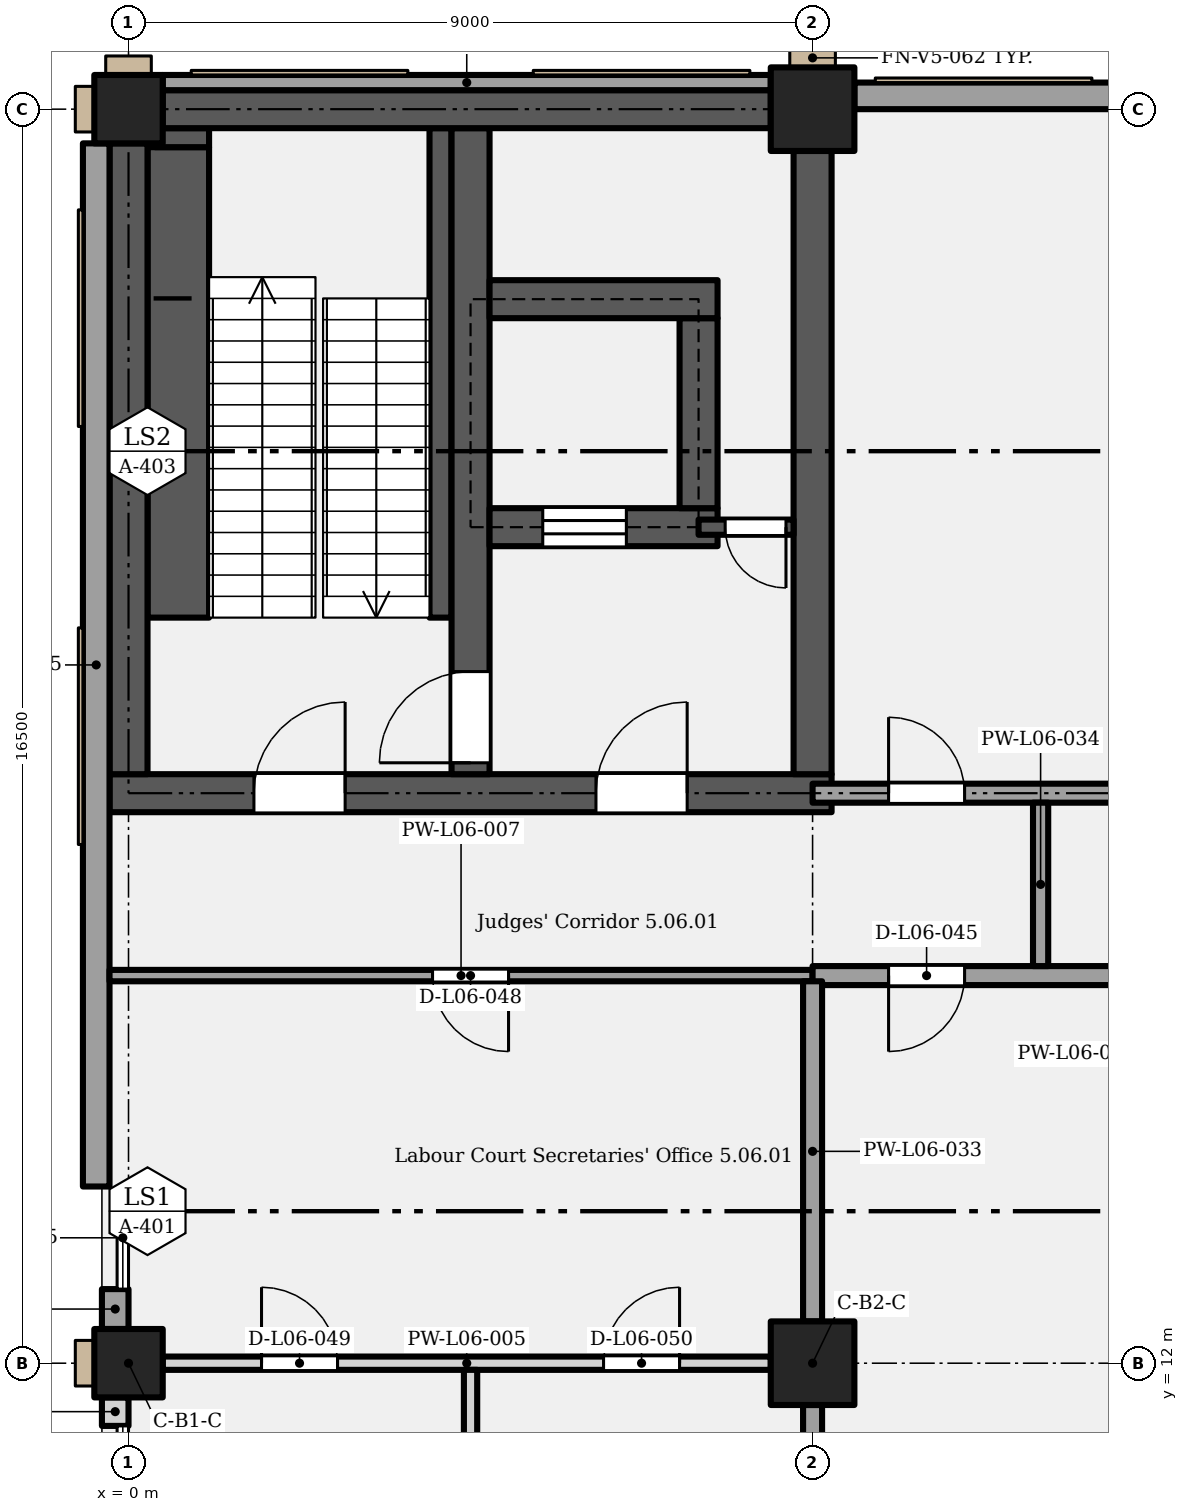
"""IFC4 building model, lengths in metres.
Left out: names, types, materials, properties, quantities, classifications, styles, units other than length and angle.
Written with IfcOpenShell. Run it as: python <this file> out.ifc"""

import sys

from ifc_helpers import new_model, si_unit, direction, frame, frame_2d, origin, origin_2d, place, context, subcontext, project, spatial, rectangle, extrude, element, fill, save


model = new_model("IFC4")
c1 = context("Model", 3, precision=1e-05, world=origin(), true_north=direction((0.0, 1.0)))
c2 = subcontext(c1, "Body", "Model", "MODEL_VIEW")
j1 = project(units=[si_unit("LENGTHUNIT", "METRE"), si_unit("PLANEANGLEUNIT", "RADIAN")], contexts=[c1])
p1 = place(None, origin())
s1 = spatial("IfcSite", under=j1, at=p1, CompositionType="ELEMENT")
p2 = place(p1, origin())
s2 = spatial("IfcBuilding", under=s1, at=p2, CompositionType="ELEMENT")
p3 = place(p2, frame((0.0, 0.0, 33.6)))
s3 = spatial("IfcBuildingStorey", under=s2, at=p3, CompositionType="ELEMENT", Elevation=33.6)
p4 = place(p3, frame((0.0, 12.0, 0.0), z_axis=(0.0, 0.0, 1.0), x_axis=(1.0, 0.0, 0.0)))
e1 = element("IfcColumn", 1, at=p4, inside=s3, PredefinedType="COLUMN", context=c2, shape_type="SweptSolid", body=[
    extrude(rectangle(XDim=0.9, YDim=0.9, at=origin_2d()), origin(), (0.0, 0.0, 1.0), 5.4),
])
p5 = place(p3, frame((9.0, 12.0, 0.0), z_axis=(0.0, 0.0, 1.0), x_axis=(1.0, 0.0, 0.0)))
e2 = element("IfcColumn", 2, at=p5, inside=s3, PredefinedType="COLUMN", context=c2, shape_type="SweptSolid", body=[
    extrude(rectangle(XDim=1.1, YDim=1.1, at=origin_2d()), origin(), (0.0, 0.0, 1.0), 5.4),
])
p6 = place(p3, frame((0.0, 28.5, 0.0), z_axis=(0.0, 0.0, 1.0), x_axis=(1.0, 0.0, 0.0)))
e3 = element("IfcColumn", 3, at=p6, inside=s3, PredefinedType="COLUMN", context=c2, shape_type="SweptSolid", body=[
    extrude(rectangle(XDim=0.9, YDim=0.9, at=origin_2d()), origin(), (0.0, 0.0, 1.0), 5.4),
])
p7 = place(p3, frame((9.0, 28.5, 0.0), z_axis=(0.0, 0.0, 1.0), x_axis=(1.0, 0.0, 0.0)))
e4 = element("IfcColumn", 4, at=p7, inside=s3, PredefinedType="COLUMN", context=c2, shape_type="SweptSolid", body=[
    extrude(rectangle(XDim=1.1, YDim=1.1, at=origin_2d()), origin(), (0.0, 0.0, 1.0), 5.4),
])
p8 = place(p3, frame((-0.25, 19.5, 0.0), z_axis=(0.0, 0.0, 1.0), x_axis=(1.0, 0.0, 0.0)))
e5 = element("IfcWall", 5, at=p8, inside=s3, PredefinedType="SHEAR", context=c2, shape_type="SweptSolid", body=[
    extrude(rectangle(XDim=9.5, YDim=0.5, at=frame_2d((4.75, 0.0))), origin(), (0.0, 0.0, 1.0), 5.15),
])
p9 = place(p8, frame((1.9, 0.0, 0.0)))
e6 = element("IfcOpeningElement", 6, at=p9, cuts=e5, PredefinedType="OPENING", context=c2, shape_type="SweptSolid", body=[
    extrude(rectangle(XDim=1.2, YDim=2.1, at=frame_2d((0.6, 1.05))), frame((0.0, 0.26, 0.0), z_axis=(0.0, -1.0, 0.0), x_axis=(1.0, 0.0, 0.0)), (0.0, 0.0, 1.0), 0.52),
])
p10 = place(p8, frame((6.4, 0.0, 0.0)))
e7 = element("IfcOpeningElement", 7, at=p10, cuts=e5, PredefinedType="OPENING", context=c2, shape_type="SweptSolid", body=[
    extrude(rectangle(XDim=1.2, YDim=2.1, at=frame_2d((0.6, 1.05))), frame((0.0, 0.26, 0.0), z_axis=(0.0, -1.0, 0.0), x_axis=(1.0, 0.0, 0.0)), (0.0, 0.0, 1.0), 0.52),
])
p11 = place(p3, frame((0.0, 19.75, 0.0), z_axis=(0.0, 0.0, 1.0), x_axis=(0.0, 1.0, 0.0)))
e8 = element("IfcWall", 8, at=p11, inside=s3, PredefinedType="SHEAR", context=c2, shape_type="SweptSolid", body=[
    extrude(rectangle(XDim=8.3, YDim=0.5, at=frame_2d((4.15, 0.0))), origin(), (0.0, 0.0, 1.0), 5.15),
])
p12 = place(p3, frame((4.5, 19.75, 0.0), z_axis=(0.0, 0.0, 1.0), x_axis=(0.0, 1.0, 0.0)))
e9 = element("IfcWall", 9, at=p12, inside=s3, PredefinedType="SHEAR", context=c2, shape_type="SweptSolid", body=[
    extrude(rectangle(XDim=8.5, YDim=0.5, at=frame_2d((4.25, 0.0))), origin(), (0.0, 0.0, 1.0), 5.15),
])
p13 = place(p12, frame((0.15, 0.0, 0.0)))
e10 = element("IfcOpeningElement", 10, at=p13, cuts=e9, PredefinedType="OPENING", context=c2, shape_type="SweptSolid", body=[
    extrude(rectangle(XDim=1.2, YDim=2.1, at=frame_2d((0.6, 1.05))), frame((0.0, 0.26, 0.0), z_axis=(0.0, -1.0, 0.0), x_axis=(1.0, 0.0, 0.0)), (0.0, 0.0, 1.0), 0.52),
])
p14 = place(p3, frame((9.0, 19.75, 0.0), z_axis=(0.0, 0.0, 1.0), x_axis=(0.0, 1.0, 0.0)))
e11 = element("IfcWall", 11, at=p14, inside=s3, PredefinedType="SHEAR", context=c2, shape_type="SweptSolid", body=[
    extrude(rectangle(XDim=8.2, YDim=0.5, at=frame_2d((4.1, 0.0))), origin(), (0.0, 0.0, 1.0), 5.15),
])
p15 = place(p3, frame((4.75, 23.0, 0.0), z_axis=(0.0, 0.0, 1.0), x_axis=(1.0, 0.0, 0.0)))
e12 = element("IfcWall", 12, at=p15, inside=s3, PredefinedType="SHEAR", context=c2, shape_type="SweptSolid", body=[
    extrude(rectangle(XDim=3.0, YDim=0.5, at=frame_2d((1.5, 0.0))), origin(), (0.0, 0.0, 1.0), 5.15),
])
p16 = place(p15, frame((0.7, 0.0, 0.0)))
e13 = element("IfcOpeningElement", 13, at=p16, cuts=e12, PredefinedType="OPENING", context=c2, shape_type="SweptSolid", body=[
    extrude(rectangle(XDim=1.1, YDim=2.1, at=frame_2d((0.55, 1.05))), frame((0.0, 0.26, 0.0), z_axis=(0.0, -1.0, 0.0), x_axis=(1.0, 0.0, 0.0)), (0.0, 0.0, 1.0), 0.52),
])
p17 = place(p3, frame((7.5, 23.25, 0.0), z_axis=(0.0, 0.0, 1.0), x_axis=(0.0, 1.0, 0.0)))
e14 = element("IfcWall", 14, at=p17, inside=s3, PredefinedType="SHEAR", context=c2, shape_type="SweptSolid", body=[
    extrude(rectangle(XDim=2.5, YDim=0.5, at=frame_2d((1.25, 0.0))), origin(), (0.0, 0.0, 1.0), 5.15),
])
p18 = place(p3, frame((4.75, 26.0, 0.0), z_axis=(0.0, 0.0, 1.0), x_axis=(1.0, 0.0, 0.0)))
e15 = element("IfcWall", 15, at=p18, inside=s3, PredefinedType="SHEAR", context=c2, shape_type="SweptSolid", body=[
    extrude(rectangle(XDim=3.0, YDim=0.5, at=frame_2d((1.5, 0.0))), origin(), (0.0, 0.0, 1.0), 5.15),
])
p19 = place(p3, frame((0.45, 28.5, 0.0), z_axis=(0.0, 0.0, 1.0), x_axis=(1.0, 0.0, 0.0)))
e16 = element("IfcWall", 16, at=p19, inside=s3, PredefinedType="SHEAR", context=c2, shape_type="SweptSolid", body=[
    extrude(rectangle(XDim=8.0, YDim=0.5, at=frame_2d((4.0, 0.0))), origin(), (0.0, 0.0, 1.0), 5.15),
])
p20 = place(p3, frame((0.45, 28.85, 0.0), z_axis=(0.0, 0.0, 1.0), x_axis=(1.0, 0.0, 0.0)))
e17 = element("IfcWall", 17, at=p20, inside=s3, PredefinedType="SOLIDWALL", context=c2, shape_type="SweptSolid", body=[
    extrude(rectangle(XDim=8.0, YDim=0.2, at=frame_2d((4.0, 0.0))), origin(), (0.0, 0.0, 1.0), 5.15),
])
p21 = place(p3, frame((9.55, 28.675, 0.0), z_axis=(0.0, 0.0, 1.0), x_axis=(1.0, 0.0, 0.0)))
e18 = element("IfcWall", 18, at=p21, inside=s3, PredefinedType="SOLIDWALL", context=c2, shape_type="SweptSolid", body=[
    extrude(rectangle(XDim=7.9, YDim=0.35, at=frame_2d((3.95, 0.0))), origin(), (0.0, 0.0, 1.0), 5.15),
])
p22 = place(p3, frame((-0.175, 11.175, 0.0), z_axis=(0.0, 0.0, 1.0), x_axis=(0.0, 1.0, 0.0)))
e19 = element("IfcWall", 19, at=p22, inside=s3, PredefinedType="SOLIDWALL", context=c2, shape_type="SweptSolid", body=[
    extrude(rectangle(XDim=0.375, YDim=0.35, at=frame_2d((0.188, 0.0))), origin(), (0.0, 0.0, 1.0), 5.15),
])
p23 = place(p3, frame((-0.175, 12.45, 0.0), z_axis=(0.0, 0.0, 1.0), x_axis=(0.0, 1.0, 0.0)))
e20 = element("IfcWall", 20, at=p23, inside=s3, PredefinedType="SOLIDWALL", context=c2, shape_type="SweptSolid", body=[
    extrude(rectangle(XDim=0.525, YDim=0.35, at=frame_2d((0.263, 0.0))), origin(), (0.0, 0.0, 1.0), 5.15),
])
p24 = place(p3, frame((-0.425, 14.325, 0.0), z_axis=(0.0, 0.0, 1.0), x_axis=(0.0, 1.0, 0.0)))
e21 = element("IfcWall", 21, at=p24, inside=s3, PredefinedType="SOLIDWALL", context=c2, shape_type="SweptSolid", body=[
    extrude(rectangle(XDim=13.725, YDim=0.35, at=frame_2d((6.863, 0.0))), origin(), (0.0, 0.0, 1.0), 5.15),
])
p25 = place(p3, frame((0.45, 12.0, 0.0), z_axis=(0.0, 0.0, 1.0), x_axis=(1.0, 0.0, 0.0)))
e22 = element("IfcWall", 22, at=p25, inside=s3, PredefinedType="PARTITIONING", context=c2, shape_type="SweptSolid", body=[
    extrude(rectangle(XDim=8.0, YDim=0.175, at=frame_2d((4.0, 0.0))), origin(), (0.0, 0.0, 1.0), 4.4),
])
p26 = place(p25, frame((1.3, 0.0, 0.0)))
e23 = element("IfcOpeningElement", 23, at=p26, cuts=e22, PredefinedType="OPENING", context=c2, shape_type="SweptSolid", body=[
    extrude(rectangle(XDim=1.0, YDim=2.1, at=frame_2d((0.5, 1.05))), frame((0.0, 0.097, 0.0), z_axis=(0.0, -1.0, 0.0), x_axis=(1.0, 0.0, 0.0)), (0.0, 0.0, 1.0), 0.195),
])
p27 = place(p25, frame((5.8, 0.0, 0.0)))
e24 = element("IfcOpeningElement", 24, at=p27, cuts=e22, PredefinedType="OPENING", context=c2, shape_type="SweptSolid", body=[
    extrude(rectangle(XDim=1.0, YDim=2.1, at=frame_2d((0.5, 1.05))), frame((0.0, 0.097, 0.0), z_axis=(0.0, -1.0, 0.0), x_axis=(1.0, 0.0, 0.0)), (0.0, 0.0, 1.0), 0.195),
])
p28 = place(p3, frame((-0.25, 17.1, 0.0), z_axis=(0.0, 0.0, 1.0), x_axis=(1.0, 0.0, 0.0)))
e25 = element("IfcWall", 25, at=p28, inside=s3, PredefinedType="PARTITIONING", context=c2, shape_type="SweptSolid", body=[
    extrude(rectangle(XDim=9.25, YDim=0.15, at=frame_2d((4.625, 0.0))), origin(), (0.0, 0.0, 1.0), 5.15),
])
p29 = place(p28, frame((5.25, 0.0, 0.0), z_axis=(0.0, 0.0, 1.0), x_axis=(-1.0, 0.0, 0.0)))
e26 = element("IfcOpeningElement", 26, at=p29, cuts=e25, PredefinedType="OPENING", context=c2, shape_type="SweptSolid", body=[
    extrude(rectangle(XDim=1.0, YDim=2.1, at=frame_2d((0.5, 1.05))), frame((0.0, 0.085, 0.0), z_axis=(0.0, -1.0, 0.0), x_axis=(1.0, 0.0, 0.0)), (0.0, 0.0, 1.0), 0.17),
])
p30 = place(p3, frame((9.0, 17.1, 0.0), z_axis=(0.0, 0.0, 1.0), x_axis=(1.0, 0.0, 0.0)))
e27 = element("IfcWall", 27, at=p30, inside=s3, PredefinedType="PARTITIONING", context=c2, shape_type="SweptSolid", body=[
    extrude(rectangle(XDim=9.0, YDim=0.25, at=frame_2d((4.5, 0.0))), origin(), (0.0, 0.0, 1.0), 5.15),
])
p31 = place(p30, frame((6.9, 0.0, 0.0), z_axis=(0.0, 0.0, 1.0), x_axis=(-1.0, 0.0, 0.0)))
e28 = element("IfcOpeningElement", 28, at=p31, cuts=e27, PredefinedType="OPENING", context=c2, shape_type="SweptSolid", body=[
    extrude(rectangle(XDim=1.8, YDim=2.4, at=frame_2d((0.9, 1.2))), frame((0.0, 0.135, 0.0), z_axis=(0.0, -1.0, 0.0), x_axis=(1.0, 0.0, 0.0)), (0.0, 0.0, 1.0), 0.27),
])
p32 = place(p30, frame((2.0, 0.0, 0.0), z_axis=(0.0, 0.0, 1.0), x_axis=(-1.0, 0.0, 0.0)))
e29 = element("IfcOpeningElement", 29, at=p32, cuts=e27, PredefinedType="OPENING", context=c2, shape_type="SweptSolid", body=[
    extrude(rectangle(XDim=1.0, YDim=2.1, at=frame_2d((0.5, 1.05))), frame((0.0, 0.135, 0.0), z_axis=(0.0, -1.0, 0.0), x_axis=(1.0, 0.0, 0.0)), (0.0, 0.0, 1.0), 0.27),
])
p33 = place(p3, frame((9.0, 19.5, 0.0), z_axis=(0.0, 0.0, 1.0), x_axis=(1.0, 0.0, 0.0)))
e30 = element("IfcWall", 30, at=p33, inside=s3, PredefinedType="PARTITIONING", context=c2, shape_type="SweptSolid", body=[
    extrude(rectangle(XDim=9.0, YDim=0.25, at=frame_2d((4.5, 0.0))), origin(), (0.0, 0.0, 1.0), 5.15),
])
p34 = place(p33, frame((5.1, 0.0, 0.0)))
e31 = element("IfcOpeningElement", 31, at=p34, cuts=e30, PredefinedType="OPENING", context=c2, shape_type="SweptSolid", body=[
    extrude(rectangle(XDim=1.8, YDim=2.4, at=frame_2d((0.9, 1.2))), frame((0.0, 0.135, 0.0), z_axis=(0.0, -1.0, 0.0), x_axis=(1.0, 0.0, 0.0)), (0.0, 0.0, 1.0), 0.27),
])
p35 = place(p33, frame((1.0, 0.0, 0.0)))
e32 = element("IfcOpeningElement", 32, at=p35, cuts=e30, PredefinedType="OPENING", context=c2, shape_type="SweptSolid", body=[
    extrude(rectangle(XDim=1.0, YDim=2.1, at=frame_2d((0.5, 1.05))), frame((0.0, 0.135, 0.0), z_axis=(0.0, -1.0, 0.0), x_axis=(1.0, 0.0, 0.0)), (0.0, 0.0, 1.0), 0.27),
])
p36 = place(p3, frame((7.5, 23.0, 0.0), z_axis=(0.0, 0.0, 1.0), x_axis=(1.0, 0.0, 0.0)))
e33 = element("IfcWall", 33, at=p36, inside=s3, PredefinedType="SHEAR", context=c2, shape_type="SweptSolid", body=[
    extrude(rectangle(XDim=1.25, YDim=0.2, at=frame_2d((0.625, 0.0))), origin(), (0.0, 0.0, 1.0), 5.15),
])
p37 = place(p36, frame((1.15, 0.0, 0.0), z_axis=(0.0, 0.0, 1.0), x_axis=(-1.0, 0.0, 0.0)))
e34 = element("IfcOpeningElement", 34, at=p37, cuts=e33, PredefinedType="OPENING", context=c2, shape_type="SweptSolid", body=[
    extrude(rectangle(XDim=0.8, YDim=2.0, at=frame_2d((0.4, 1.0))), frame((0.0, 0.11, 0.0), z_axis=(0.0, -1.0, 0.0), x_axis=(1.0, 0.0, 0.0)), (0.0, 0.0, 1.0), 0.22),
])
p38 = place(p3, frame((4.5, 0.0, 0.0), z_axis=(0.0, 0.0, 1.0), x_axis=(0.0, 1.0, 0.0)))
e35 = element("IfcWall", 35, at=p38, inside=s3, PredefinedType="PARTITIONING", context=c2, shape_type="SweptSolid", body=[
    extrude(rectangle(XDim=11.913, YDim=0.175, at=frame_2d((5.956, 0.0))), origin(), (0.0, 0.0, 1.0), 5.15),
])
p39 = place(p3, frame((9.0, 0.55, 0.0), z_axis=(0.0, 0.0, 1.0), x_axis=(0.0, 1.0, 0.0)))
e36 = element("IfcWall", 36, at=p39, inside=s3, PredefinedType="PARTITIONING", context=c2, shape_type="SweptSolid", body=[
    extrude(rectangle(XDim=10.9, YDim=0.25, at=frame_2d((5.45, 0.0))), origin(), (0.0, 0.0, 1.0), 4.4),
])
p40 = place(p39, frame((5.95, 0.0, 0.0), z_axis=(0.0, 0.0, 1.0), x_axis=(-1.0, 0.0, 0.0)))
e37 = element("IfcOpeningElement", 37, at=p40, cuts=e36, PredefinedType="OPENING", context=c2, shape_type="SweptSolid", body=[
    extrude(rectangle(XDim=1.0, YDim=2.1, at=frame_2d((0.5, 1.05))), frame((0.0, 0.135, 0.0), z_axis=(0.0, -1.0, 0.0), x_axis=(1.0, 0.0, 0.0)), (0.0, 0.0, 1.0), 0.27),
])
p41 = place(p3, frame((9.0, 12.55, 0.0), z_axis=(0.0, 0.0, 1.0), x_axis=(0.0, 1.0, 0.0)))
e38 = element("IfcWall", 38, at=p41, inside=s3, PredefinedType="PARTITIONING", context=c2, shape_type="SweptSolid", body=[
    extrude(rectangle(XDim=4.475, YDim=0.25, at=frame_2d((2.237, 0.0))), origin(), (0.0, 0.0, 1.0), 4.2),
])
p42 = place(p3, frame((12.0, 17.225, 0.0), z_axis=(0.0, 0.0, 1.0), x_axis=(0.0, 1.0, 0.0)))
e39 = element("IfcWall", 39, at=p42, inside=s3, PredefinedType="PARTITIONING", context=c2, shape_type="SweptSolid", body=[
    extrude(rectangle(XDim=2.15, YDim=0.2, at=frame_2d((1.075, 0.0))), origin(), (0.0, 0.0, 1.0), 5.15),
])
p43 = place(p3, frame((0.655, 21.81, 0.0), z_axis=(0.0, 0.0, 1.0), x_axis=(0.0, 1.0, 0.0)))
e40 = element("IfcWall", 40, at=p43, inside=s3, PredefinedType="SHEAR", context=c2, shape_type="SweptSolid", body=[
    extrude(rectangle(XDim=6.19, YDim=0.81, at=frame_2d((3.095, 0.0))), origin(), (0.0, 0.0, 1.0), 2.587),
])
p44 = place(p3, frame((0.705, 28.0, 0.0), z_axis=(0.0, 0.0, 1.0), x_axis=(0.0, 1.0, 0.0)))
e41 = element("IfcWall", 41, at=p44, inside=s3, PredefinedType="SHEAR", context=c2, shape_type="SweptSolid", body=[
    extrude(rectangle(XDim=0.25, YDim=0.71, at=frame_2d((0.125, 0.0))), origin(), (0.0, 0.0, 1.0), 2.587),
])
p45 = place(p3, frame((4.105, 21.81, 0.0), z_axis=(0.0, 0.0, 1.0), x_axis=(0.0, 1.0, 0.0)))
e42 = element("IfcWall", 42, at=p45, inside=s3, PredefinedType="SHEAR", context=c2, shape_type="SweptSolid", body=[
    extrude(rectangle(XDim=6.44, YDim=0.29, at=frame_2d((3.22, 0.0))), origin(), (0.0, 0.0, 1.0), 2.587),
])
p46 = place(p9, origin())
e43 = element("IfcDoor", 43, at=p46, inside=s3, OperationType="SINGLE_SWING_RIGHT", PredefinedType="DOOR", context=c2, shape_type="SweptSolid", body=[
    extrude(rectangle(XDim=1.2, YDim=2.1, at=frame_2d((0.6, 1.05))), frame((0.0, 0.025, 0.0), z_axis=(0.0, -1.0, 0.0), x_axis=(1.0, 0.0, 0.0)), (0.0, 0.0, 1.0), 0.05),
])
fill(e6, e43)
p47 = place(p13, origin())
e44 = element("IfcDoor", 44, at=p47, inside=s3, OperationType="SINGLE_SWING_LEFT", PredefinedType="DOOR", context=c2, shape_type="SweptSolid", body=[
    extrude(rectangle(XDim=1.2, YDim=2.1, at=frame_2d((0.6, 1.05))), frame((0.0, 0.025, 0.0), z_axis=(0.0, -1.0, 0.0), x_axis=(1.0, 0.0, 0.0)), (0.0, 0.0, 1.0), 0.05),
])
fill(e10, e44)
p48 = place(p10, origin())
e45 = element("IfcDoor", 45, at=p48, inside=s3, OperationType="SINGLE_SWING_RIGHT", PredefinedType="DOOR", context=c2, shape_type="SweptSolid", body=[
    extrude(rectangle(XDim=1.2, YDim=2.1, at=frame_2d((0.6, 1.05))), frame((0.0, 0.025, 0.0), z_axis=(0.0, -1.0, 0.0), x_axis=(1.0, 0.0, 0.0)), (0.0, 0.0, 1.0), 0.05),
])
fill(e7, e45)
p49 = place(p16, origin())
e46 = element("IfcDoor", 46, at=p49, inside=s3, OperationType="SLIDING_TO_LEFT", PredefinedType="DOOR", context=c2, shape_type="SweptSolid", body=[
    extrude(rectangle(XDim=1.1, YDim=2.1, at=frame_2d((0.55, 1.05))), frame((0.0, 0.025, 0.0), z_axis=(0.0, -1.0, 0.0), x_axis=(1.0, 0.0, 0.0)), (0.0, 0.0, 1.0), 0.05),
])
fill(e13, e46)
p50 = place(p37, origin())
e47 = element("IfcDoor", 47, at=p50, inside=s3, OperationType="SINGLE_SWING_LEFT", PredefinedType="DOOR", context=c2, shape_type="SweptSolid", body=[
    extrude(rectangle(XDim=0.8, YDim=2.0, at=frame_2d((0.4, 1.0))), frame((0.0, 0.025, 0.0), z_axis=(0.0, -1.0, 0.0), x_axis=(1.0, 0.0, 0.0)), (0.0, 0.0, 1.0), 0.05),
])
fill(e34, e47)
p51 = place(p32, origin())
e48 = element("IfcDoor", 48, at=p51, inside=s3, OperationType="SINGLE_SWING_RIGHT", PredefinedType="DOOR", context=c2, shape_type="SweptSolid", body=[
    extrude(rectangle(XDim=1.0, YDim=2.1, at=frame_2d((0.5, 1.05))), frame((0.0, 0.025, 0.0), z_axis=(0.0, -1.0, 0.0), x_axis=(1.0, 0.0, 0.0)), (0.0, 0.0, 1.0), 0.05),
])
fill(e29, e48)
p52 = place(p35, origin())
e49 = element("IfcDoor", 49, at=p52, inside=s3, OperationType="SINGLE_SWING_LEFT", PredefinedType="DOOR", context=c2, shape_type="SweptSolid", body=[
    extrude(rectangle(XDim=1.0, YDim=2.1, at=frame_2d((0.5, 1.05))), frame((0.0, 0.025, 0.0), z_axis=(0.0, -1.0, 0.0), x_axis=(1.0, 0.0, 0.0)), (0.0, 0.0, 1.0), 0.05),
])
fill(e32, e49)
p53 = place(p29, origin())
e50 = element("IfcDoor", 50, at=p53, inside=s3, OperationType="SINGLE_SWING_LEFT", PredefinedType="DOOR", context=c2, shape_type="SweptSolid", body=[
    extrude(rectangle(XDim=1.0, YDim=2.1, at=frame_2d((0.5, 1.05))), frame((0.0, 0.025, 0.0), z_axis=(0.0, -1.0, 0.0), x_axis=(1.0, 0.0, 0.0)), (0.0, 0.0, 1.0), 0.05),
])
fill(e26, e50)
p54 = place(p26, origin())
e51 = element("IfcDoor", 51, at=p54, inside=s3, OperationType="SINGLE_SWING_LEFT", PredefinedType="DOOR", context=c2, shape_type="SweptSolid", body=[
    extrude(rectangle(XDim=1.0, YDim=2.1, at=frame_2d((0.5, 1.05))), frame((0.0, 0.025, 0.0), z_axis=(0.0, -1.0, 0.0), x_axis=(1.0, 0.0, 0.0)), (0.0, 0.0, 1.0), 0.05),
])
fill(e23, e51)
p55 = place(p27, origin())
e52 = element("IfcDoor", 52, at=p55, inside=s3, OperationType="SINGLE_SWING_RIGHT", PredefinedType="DOOR", context=c2, shape_type="SweptSolid", body=[
    extrude(rectangle(XDim=1.0, YDim=2.1, at=frame_2d((0.5, 1.05))), frame((0.0, 0.025, 0.0), z_axis=(0.0, -1.0, 0.0), x_axis=(1.0, 0.0, 0.0)), (0.0, 0.0, 1.0), 0.05),
])
fill(e24, e52)
save(model, sys.argv[1])
